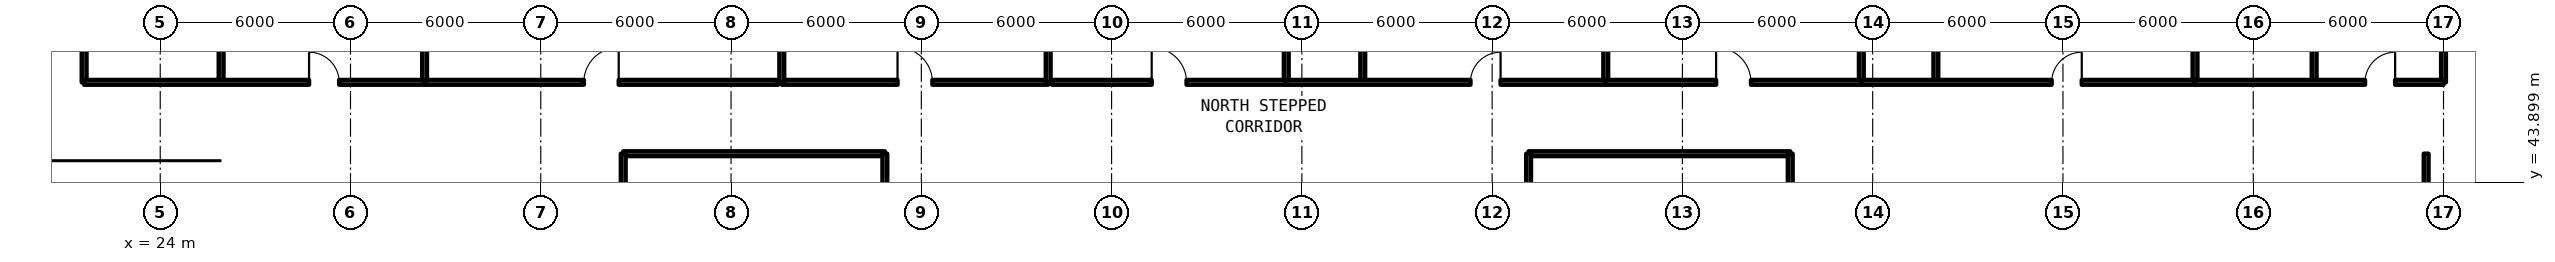
"""IFC4 building model, lengths in metres.
Left out: names, types, materials, properties, quantities, classifications, styles, units other than length and angle.
Written with IfcOpenShell. Run it as: python <this file> out.ifc"""

import sys

from ifc_helpers import new_model, si_unit, direction, frame, frame_2d, origin, place, context, subcontext, project, spatial, rectangle, extrude, element, fill, save


model = new_model("IFC4")
c1 = context("Model", 3, precision=1e-05, world=origin(), true_north=direction((0.0, 1.0)))
c2 = subcontext(c1, "Body", "Model", "MODEL_VIEW")
j1 = project(units=[si_unit("LENGTHUNIT", "METRE"), si_unit("PLANEANGLEUNIT", "RADIAN")], contexts=[c1])
p1 = place(None, origin())
s1 = spatial("IfcSite", under=j1, at=p1, CompositionType="ELEMENT")
p2 = place(p1, origin())
s2 = spatial("IfcBuilding", under=s1, at=p2, CompositionType="ELEMENT")
p3 = place(p2, frame((0.0, 0.0, 95.37)))
s3 = spatial("IfcBuildingStorey", under=s2, at=p3, CompositionType="ELEMENT", Elevation=95.37)
p4 = place(p3, frame((38.6, 44.8, 0.0), z_axis=(0.0, 0.0, 1.0), x_axis=(1.0, 0.0, 0.0)))
e1 = element("IfcWall", 1, at=p4, inside=s3, PredefinedType="SOLIDWALL", context=c2, shape_type="SweptSolid", body=[
    extrude(rectangle(XDim=8.25, YDim=0.15, at=frame_2d((4.125, 0.0))), origin(), (0.0, 0.0, 1.0), 2.35),
])
p5 = place(p3, frame((38.6, 22.4, 0.0), z_axis=(0.0, 0.0, 1.0), x_axis=(0.0, 1.0, 0.0)))
e2 = element("IfcWall", 2, at=p5, inside=s3, PredefinedType="SOLIDWALL", context=c2, shape_type="SweptSolid", body=[
    extrude(rectangle(XDim=22.4, YDim=0.15, at=frame_2d((11.2, 0.0))), origin(), (0.0, 0.0, 1.0), 2.35),
])
p6 = place(p5, frame((8.025, 0.0, 0.0)))
e3 = element("IfcOpeningElement", 3, at=p6, cuts=e2, PredefinedType="OPENING", context=c2, shape_type="SweptSolid", body=[
    extrude(rectangle(XDim=0.95, YDim=2.15, at=frame_2d((0.475, 1.075))), frame((0.0, 0.085, 0.0), z_axis=(0.0, -1.0, 0.0), x_axis=(1.0, 0.0, 0.0)), (0.0, 0.0, 1.0), 0.17),
])
p7 = place(p3, frame((46.85, 22.4, 0.0), z_axis=(0.0, 0.0, 1.0), x_axis=(0.0, 1.0, 0.0)))
e4 = element("IfcWall", 4, at=p7, inside=s3, PredefinedType="SOLIDWALL", context=c2, shape_type="SweptSolid", body=[
    extrude(rectangle(XDim=22.4, YDim=0.15, at=frame_2d((11.2, 0.0))), origin(), (0.0, 0.0, 1.0), 2.35),
])
p8 = place(p3, frame((67.15, 44.8, 0.0), z_axis=(0.0, 0.0, 1.0), x_axis=(1.0, 0.0, 0.0)))
e5 = element("IfcWall", 5, at=p8, inside=s3, PredefinedType="SOLIDWALL", context=c2, shape_type="SweptSolid", body=[
    extrude(rectangle(XDim=8.25, YDim=0.15, at=frame_2d((4.125, 0.0))), origin(), (0.0, 0.0, 1.0), 2.35),
])
p9 = place(p3, frame((67.15, 22.4, 0.0), z_axis=(0.0, 0.0, 1.0), x_axis=(0.0, 1.0, 0.0)))
e6 = element("IfcWall", 6, at=p9, inside=s3, PredefinedType="SOLIDWALL", context=c2, shape_type="SweptSolid", body=[
    extrude(rectangle(XDim=22.4, YDim=0.15, at=frame_2d((11.2, 0.0))), origin(), (0.0, 0.0, 1.0), 2.35),
])
p10 = place(p3, frame((75.4, 22.4, 0.0), z_axis=(0.0, 0.0, 1.0), x_axis=(0.0, 1.0, 0.0)))
e7 = element("IfcWall", 7, at=p10, inside=s3, PredefinedType="SOLIDWALL", context=c2, shape_type="SweptSolid", body=[
    extrude(rectangle(XDim=22.4, YDim=0.15, at=frame_2d((11.2, 0.0))), origin(), (0.0, 0.0, 1.0), 2.35),
])
p11 = place(p10, frame((8.025, 0.0, 0.0)))
e8 = element("IfcOpeningElement", 8, at=p11, cuts=e7, PredefinedType="OPENING", context=c2, shape_type="SweptSolid", body=[
    extrude(rectangle(XDim=0.95, YDim=2.15, at=frame_2d((0.475, 1.075))), frame((0.0, 0.085, 0.0), z_axis=(0.0, -1.0, 0.0), x_axis=(1.0, 0.0, 0.0)), (0.0, 0.0, 1.0), 0.17),
])
p12 = place(p3, frame((95.452, 39.6, 0.0), z_axis=(0.0, 0.0, 1.0), x_axis=(0.0, 1.0, 0.0)))
e9 = element("IfcWall", 9, at=p12, inside=s3, PredefinedType="PARTITIONING", context=c2, shape_type="SweptSolid", body=[
    extrude(rectangle(XDim=5.2, YDim=0.15, at=frame_2d((2.6, 0.0))), origin(), (0.0, 0.0, 1.0), 2.35),
])
p13 = place(p3, frame((43.6, 47.05, 0.0), z_axis=(0.0, 0.0, 1.0), x_axis=(1.0, 0.0, 0.0)))
e10 = element("IfcWall", 10, at=p13, inside=s3, PredefinedType="SOLIDWALL", context=c2, shape_type="SweptSolid", body=[
    extrude(rectangle(XDim=8.4, YDim=0.15, at=frame_2d((4.2, 0.0))), origin(), (0.0, 0.0, 1.0), 2.35),
])
p14 = place(p13, frame((3.65, 0.0, 0.0)))
e11 = element("IfcOpeningElement", 11, at=p14, cuts=e10, PredefinedType="OPENING", context=c2, shape_type="SweptSolid", body=[
    extrude(rectangle(XDim=1.1, YDim=2.15, at=frame_2d((0.55, 1.075))), frame((0.0, 0.085, 0.0), z_axis=(0.0, -1.0, 0.0), x_axis=(1.0, 0.0, 0.0)), (0.0, 0.0, 1.0), 0.17),
])
for number, where, z_axis, x_axis in (
    (12, (43.6, 47.05, 0.0), (0.0, 0.0, 1.0), (0.0, 1.0, 0.0)),
    (13, (52.0, 47.05, 0.0), (0.0, 0.0, 1.0), (0.0, 1.0, 0.0)),
    (14, (21.6, 47.05, 0.0), (0.0, 0.0, 1.0), (0.0, 1.0, 0.0)),
    (15, (32.336, 47.05, 0.0), (0.0, 0.0, 1.0), (0.0, 1.0, 0.0)),
):
    element("IfcWall", number, at=place(p3, frame(where, z_axis=z_axis, x_axis=x_axis)), inside=s3, PredefinedType="SOLIDWALL", context=c2, shape_type="SweptSolid", body=[
        extrude(rectangle(XDim=10.3, YDim=0.15, at=frame_2d((5.15, 0.0))), origin(), (0.0, 0.0, 1.0), 2.35),
    ])
p15 = place(p3, frame((25.92, 47.05, 0.0), z_axis=(0.0, 0.0, 1.0), x_axis=(0.0, 1.0, 0.0)))
e16 = element("IfcWall", 16, at=p15, inside=s3, PredefinedType="PARTITIONING", context=c2, shape_type="SweptSolid", body=[
    extrude(rectangle(XDim=5.557, YDim=0.15, at=frame_2d((2.779, 0.0))), origin(), (0.0, 0.0, 1.0), 2.35),
])
p16 = place(p15, frame((1.214, 0.0, 0.0)))
e17 = element("IfcOpeningElement", 17, at=p16, cuts=e16, PredefinedType="OPENING", context=c2, shape_type="SweptSolid", body=[
    extrude(rectangle(XDim=0.85, YDim=2.1, at=frame_2d((0.425, 1.05))), frame((0.0, 0.085, 0.0), z_axis=(0.0, -1.0, 0.0), x_axis=(1.0, 0.0, 0.0)), (0.0, 0.0, 1.0), 0.17),
])
p17 = place(p15, frame((3.993, 0.0, 0.0)))
e18 = element("IfcOpeningElement", 18, at=p17, cuts=e16, PredefinedType="OPENING", context=c2, shape_type="SweptSolid", body=[
    extrude(rectangle(XDim=0.85, YDim=2.1, at=frame_2d((0.425, 1.05))), frame((0.0, 0.085, 0.0), z_axis=(0.0, -1.0, 0.0), x_axis=(1.0, 0.0, 0.0)), (0.0, 0.0, 1.0), 0.17),
])
p18 = place(p3, frame((21.6, 47.05, 0.0), z_axis=(0.0, 0.0, 1.0), x_axis=(1.0, 0.0, 0.0)))
e19 = element("IfcWall", 19, at=p18, inside=s3, PredefinedType="SOLIDWALL", context=c2, shape_type="SweptSolid", body=[
    extrude(rectangle(XDim=10.736, YDim=0.15, at=frame_2d((5.368, 0.0))), origin(), (0.0, 0.0, 1.0), 2.35),
])
p19 = place(p18, frame((7.093, 0.0, 0.0)))
e20 = element("IfcOpeningElement", 20, at=p19, cuts=e19, PredefinedType="OPENING", context=c2, shape_type="SweptSolid", body=[
    extrude(rectangle(XDim=0.95, YDim=2.15, at=frame_2d((0.475, 1.075))), frame((0.0, 0.085, 0.0), z_axis=(0.0, -1.0, 0.0), x_axis=(1.0, 0.0, 0.0)), (0.0, 0.0, 1.0), 0.17),
])
p20 = place(p3, frame((32.336, 47.05, 0.0), z_axis=(0.0, 0.0, 1.0), x_axis=(1.0, 0.0, 0.0)))
e21 = element("IfcWall", 21, at=p20, inside=s3, PredefinedType="SOLIDWALL", context=c2, shape_type="SweptSolid", body=[
    extrude(rectangle(XDim=11.144, YDim=0.15, at=frame_2d((5.572, 0.0))), origin(), (0.0, 0.0, 1.0), 2.35),
])
p21 = place(p20, frame((5.022, 0.0, 0.0)))
e22 = element("IfcOpeningElement", 22, at=p21, cuts=e21, PredefinedType="OPENING", context=c2, shape_type="SweptSolid", body=[
    extrude(rectangle(XDim=1.1, YDim=2.15, at=frame_2d((0.55, 1.075))), frame((0.0, 0.085, 0.0), z_axis=(0.0, -1.0, 0.0), x_axis=(1.0, 0.0, 0.0)), (0.0, 0.0, 1.0), 0.17),
])
for number, where, z_axis, x_axis in (
    (23, (96.0, 47.05, 0.0), (0.0, 0.0, 1.0), (0.0, 1.0, 0.0)),
    (24, (59.508, 47.05, 0.0), (0.0, 0.0, 1.0), (0.0, 1.0, 0.0)),
):
    element("IfcWall", number, at=place(p3, frame(where, z_axis=z_axis, x_axis=x_axis)), inside=s3, PredefinedType="SOLIDWALL", context=c2, shape_type="SweptSolid", body=[
        extrude(rectangle(XDim=10.3, YDim=0.15, at=frame_2d((5.15, 0.0))), origin(), (0.0, 0.0, 1.0), 2.35),
    ])
p22 = place(p3, frame((52.12, 47.05, 0.0), z_axis=(0.0, 0.0, 1.0), x_axis=(1.0, 0.0, 0.0)))
e25 = element("IfcWall", 25, at=p22, inside=s3, PredefinedType="SOLIDWALL", context=c2, shape_type="SweptSolid", body=[
    extrude(rectangle(XDim=7.388, YDim=0.15, at=frame_2d((3.694, 0.0))), origin(), (0.0, 0.0, 1.0), 2.35),
])
p23 = place(p22, frame((3.144, 0.0, 0.0)))
e26 = element("IfcOpeningElement", 26, at=p23, cuts=e25, PredefinedType="OPENING", context=c2, shape_type="SweptSolid", body=[
    extrude(rectangle(XDim=1.1, YDim=2.15, at=frame_2d((0.55, 1.075))), frame((0.0, 0.085, 0.0), z_axis=(0.0, -1.0, 0.0), x_axis=(1.0, 0.0, 0.0)), (0.0, 0.0, 1.0), 0.17),
])
p24 = place(p3, frame((69.583, 47.05, 0.0), z_axis=(0.0, 0.0, 1.0), x_axis=(0.0, 1.0, 0.0)))
e27 = element("IfcWall", 27, at=p24, inside=s3, PredefinedType="SOLIDWALL", context=c2, shape_type="SweptSolid", body=[
    extrude(rectangle(XDim=10.3, YDim=0.15, at=frame_2d((5.15, 0.0))), origin(), (0.0, 0.0, 1.0), 2.35),
])
p25 = place(p3, frame((61.92, 47.05, 0.0), z_axis=(0.0, 0.0, 1.0), x_axis=(0.0, 1.0, 0.0)))
e28 = element("IfcWall", 28, at=p25, inside=s3, PredefinedType="PARTITIONING", context=c2, shape_type="SweptSolid", body=[
    extrude(rectangle(XDim=5.1, YDim=0.15, at=frame_2d((2.55, 0.0))), origin(), (0.0, 0.0, 1.0), 2.35),
])
p26 = place(p25, frame((1.08, 0.0, 0.0)))
e29 = element("IfcOpeningElement", 29, at=p26, cuts=e28, PredefinedType="OPENING", context=c2, shape_type="SweptSolid", body=[
    extrude(rectangle(XDim=0.85, YDim=2.1, at=frame_2d((0.425, 1.05))), frame((0.0, 0.085, 0.0), z_axis=(0.0, -1.0, 0.0), x_axis=(1.0, 0.0, 0.0)), (0.0, 0.0, 1.0), 0.17),
])
p27 = place(p25, frame((3.629, 0.0, 0.0)))
e30 = element("IfcOpeningElement", 30, at=p27, cuts=e28, PredefinedType="OPENING", context=c2, shape_type="SweptSolid", body=[
    extrude(rectangle(XDim=0.85, YDim=2.1, at=frame_2d((0.425, 1.05))), frame((0.0, 0.085, 0.0), z_axis=(0.0, -1.0, 0.0), x_axis=(1.0, 0.0, 0.0)), (0.0, 0.0, 1.0), 0.17),
])
p28 = place(p3, frame((59.508, 47.05, 0.0), z_axis=(0.0, 0.0, 1.0), x_axis=(1.0, 0.0, 0.0)))
e31 = element("IfcWall", 31, at=p28, inside=s3, PredefinedType="SOLIDWALL", context=c2, shape_type="SweptSolid", body=[
    extrude(rectangle(XDim=10.074, YDim=0.15, at=frame_2d((5.037, 0.0))), origin(), (0.0, 0.0, 1.0), 2.35),
])
p29 = place(p28, frame((5.808, 0.0, 0.0)))
e32 = element("IfcOpeningElement", 32, at=p29, cuts=e31, PredefinedType="OPENING", context=c2, shape_type="SweptSolid", body=[
    extrude(rectangle(XDim=0.95, YDim=2.15, at=frame_2d((0.475, 1.075))), frame((0.0, 0.085, 0.0), z_axis=(0.0, -1.0, 0.0), x_axis=(1.0, 0.0, 0.0)), (0.0, 0.0, 1.0), 0.17),
])
p30 = place(p3, frame((77.642, 47.05, 0.0), z_axis=(0.0, 0.0, 1.0), x_axis=(0.0, 1.0, 0.0)))
e33 = element("IfcWall", 33, at=p30, inside=s3, PredefinedType="SOLIDWALL", context=c2, shape_type="SweptSolid", body=[
    extrude(rectangle(XDim=10.3, YDim=0.15, at=frame_2d((5.15, 0.0))), origin(), (0.0, 0.0, 1.0), 2.35),
])
p31 = place(p3, frame((69.583, 47.05, 0.0), z_axis=(0.0, 0.0, 1.0), x_axis=(1.0, 0.0, 0.0)))
e34 = element("IfcWall", 34, at=p31, inside=s3, PredefinedType="SOLIDWALL", context=c2, shape_type="SweptSolid", body=[
    extrude(rectangle(XDim=8.06, YDim=0.15, at=frame_2d((4.03, 0.0))), origin(), (0.0, 0.0, 1.0), 2.35),
])
p32 = place(p31, frame((3.48, 0.0, 0.0)))
e35 = element("IfcOpeningElement", 35, at=p32, cuts=e34, PredefinedType="OPENING", context=c2, shape_type="SweptSolid", body=[
    extrude(rectangle(XDim=1.1, YDim=2.15, at=frame_2d((0.55, 1.075))), frame((0.0, 0.085, 0.0), z_axis=(0.0, -1.0, 0.0), x_axis=(1.0, 0.0, 0.0)), (0.0, 0.0, 1.0), 0.17),
])
p33 = place(p3, frame((88.164, 47.05, 0.0), z_axis=(0.0, 0.0, 1.0), x_axis=(0.0, 1.0, 0.0)))
e36 = element("IfcWall", 36, at=p33, inside=s3, PredefinedType="SOLIDWALL", context=c2, shape_type="SweptSolid", body=[
    extrude(rectangle(XDim=10.3, YDim=0.15, at=frame_2d((5.15, 0.0))), origin(), (0.0, 0.0, 1.0), 2.35),
])
p34 = place(p3, frame((79.992, 47.05, 0.0), z_axis=(0.0, 0.0, 1.0), x_axis=(0.0, 1.0, 0.0)))
e37 = element("IfcWall", 37, at=p34, inside=s3, PredefinedType="PARTITIONING", context=c2, shape_type="SweptSolid", body=[
    extrude(rectangle(XDim=5.1, YDim=0.15, at=frame_2d((2.55, 0.0))), origin(), (0.0, 0.0, 1.0), 2.35),
])
p35 = place(p34, frame((1.08, 0.0, 0.0)))
e38 = element("IfcOpeningElement", 38, at=p35, cuts=e37, PredefinedType="OPENING", context=c2, shape_type="SweptSolid", body=[
    extrude(rectangle(XDim=0.85, YDim=2.1, at=frame_2d((0.425, 1.05))), frame((0.0, 0.085, 0.0), z_axis=(0.0, -1.0, 0.0), x_axis=(1.0, 0.0, 0.0)), (0.0, 0.0, 1.0), 0.17),
])
p36 = place(p34, frame((3.629, 0.0, 0.0)))
e39 = element("IfcOpeningElement", 39, at=p36, cuts=e37, PredefinedType="OPENING", context=c2, shape_type="SweptSolid", body=[
    extrude(rectangle(XDim=0.85, YDim=2.1, at=frame_2d((0.425, 1.05))), frame((0.0, 0.085, 0.0), z_axis=(0.0, -1.0, 0.0), x_axis=(1.0, 0.0, 0.0)), (0.0, 0.0, 1.0), 0.17),
])
p37 = place(p3, frame((77.642, 47.05, 0.0), z_axis=(0.0, 0.0, 1.0), x_axis=(1.0, 0.0, 0.0)))
e40 = element("IfcWall", 40, at=p37, inside=s3, PredefinedType="SOLIDWALL", context=c2, shape_type="SweptSolid", body=[
    extrude(rectangle(XDim=10.522, YDim=0.15, at=frame_2d((5.261, 0.0))), origin(), (0.0, 0.0, 1.0), 2.35),
])
p38 = place(p37, frame((6.001, 0.0, 0.0)))
e41 = element("IfcOpeningElement", 41, at=p38, cuts=e40, PredefinedType="OPENING", context=c2, shape_type="SweptSolid", body=[
    extrude(rectangle(XDim=0.95, YDim=2.15, at=frame_2d((0.475, 1.075))), frame((0.0, 0.085, 0.0), z_axis=(0.0, -1.0, 0.0), x_axis=(1.0, 0.0, 0.0)), (0.0, 0.0, 1.0), 0.17),
])
p39 = place(p3, frame((91.92, 47.05, 0.0), z_axis=(0.0, 0.0, 1.0), x_axis=(0.0, 1.0, 0.0)))
e42 = element("IfcWall", 42, at=p39, inside=s3, PredefinedType="PARTITIONING", context=c2, shape_type="SweptSolid", body=[
    extrude(rectangle(XDim=6.535, YDim=0.15, at=frame_2d((3.268, 0.0))), origin(), (0.0, 0.0, 1.0), 2.35),
])
p40 = place(p39, frame((1.503, 0.0, 0.0)))
e43 = element("IfcOpeningElement", 43, at=p40, cuts=e42, PredefinedType="OPENING", context=c2, shape_type="SweptSolid", body=[
    extrude(rectangle(XDim=0.85, YDim=2.1, at=frame_2d((0.425, 1.05))), frame((0.0, 0.085, 0.0), z_axis=(0.0, -1.0, 0.0), x_axis=(1.0, 0.0, 0.0)), (0.0, 0.0, 1.0), 0.17),
])
p41 = place(p39, frame((4.771, 0.0, 0.0)))
e44 = element("IfcOpeningElement", 44, at=p41, cuts=e42, PredefinedType="OPENING", context=c2, shape_type="SweptSolid", body=[
    extrude(rectangle(XDim=0.85, YDim=2.1, at=frame_2d((0.425, 1.05))), frame((0.0, 0.085, 0.0), z_axis=(0.0, -1.0, 0.0), x_axis=(1.0, 0.0, 0.0)), (0.0, 0.0, 1.0), 0.17),
])
p42 = place(p3, frame((88.164, 47.05, 0.0), z_axis=(0.0, 0.0, 1.0), x_axis=(1.0, 0.0, 0.0)))
e45 = element("IfcWall", 45, at=p42, inside=s3, PredefinedType="SOLIDWALL", context=c2, shape_type="SweptSolid", body=[
    extrude(rectangle(XDim=7.836, YDim=0.15, at=frame_2d((3.918, 0.0))), origin(), (0.0, 0.0, 1.0), 2.35),
])
p43 = place(p42, frame((5.361, 0.0, 0.0)))
e46 = element("IfcOpeningElement", 46, at=p43, cuts=e45, PredefinedType="OPENING", context=c2, shape_type="SweptSolid", body=[
    extrude(rectangle(XDim=0.95, YDim=2.15, at=frame_2d((0.475, 1.075))), frame((0.0, 0.085, 0.0), z_axis=(0.0, -1.0, 0.0), x_axis=(1.0, 0.0, 0.0)), (0.0, 0.0, 1.0), 0.17),
])
p44 = place(p14, origin())
e47 = element("IfcDoor", 47, at=p44, inside=s3, OperationType="SINGLE_SWING_LEFT", PredefinedType="DOOR", context=c2, shape_type="SweptSolid", body=[
    extrude(rectangle(XDim=1.1, YDim=2.15, at=frame_2d((0.55, 1.075))), frame((0.0, 0.025, 0.0), z_axis=(0.0, -1.0, 0.0), x_axis=(1.0, 0.0, 0.0)), (0.0, 0.0, 1.0), 0.05),
])
fill(e11, e47)
p45 = place(p19, origin())
e48 = element("IfcDoor", 48, at=p45, inside=s3, OperationType="SINGLE_SWING_LEFT", PredefinedType="DOOR", context=c2, shape_type="SweptSolid", body=[
    extrude(rectangle(XDim=0.95, YDim=2.15, at=frame_2d((0.475, 1.075))), frame((0.0, 0.025, 0.0), z_axis=(0.0, -1.0, 0.0), x_axis=(1.0, 0.0, 0.0)), (0.0, 0.0, 1.0), 0.05),
])
fill(e20, e48)
p46 = place(p21, origin())
e49 = element("IfcDoor", 49, at=p46, inside=s3, OperationType="SINGLE_SWING_RIGHT", PredefinedType="DOOR", context=c2, shape_type="SweptSolid", body=[
    extrude(rectangle(XDim=1.1, YDim=2.15, at=frame_2d((0.55, 1.075))), frame((0.0, 0.025, 0.0), z_axis=(0.0, -1.0, 0.0), x_axis=(1.0, 0.0, 0.0)), (0.0, 0.0, 1.0), 0.05),
])
fill(e22, e49)
p47 = place(p23, origin())
e50 = element("IfcDoor", 50, at=p47, inside=s3, OperationType="SINGLE_SWING_LEFT", PredefinedType="DOOR", context=c2, shape_type="SweptSolid", body=[
    extrude(rectangle(XDim=1.1, YDim=2.15, at=frame_2d((0.55, 1.075))), frame((0.0, 0.025, 0.0), z_axis=(0.0, -1.0, 0.0), x_axis=(1.0, 0.0, 0.0)), (0.0, 0.0, 1.0), 0.05),
])
fill(e26, e50)
p48 = place(p29, origin())
e51 = element("IfcDoor", 51, at=p48, inside=s3, OperationType="SINGLE_SWING_RIGHT", PredefinedType="DOOR", context=c2, shape_type="SweptSolid", body=[
    extrude(rectangle(XDim=0.95, YDim=2.15, at=frame_2d((0.475, 1.075))), frame((0.0, 0.025, 0.0), z_axis=(0.0, -1.0, 0.0), x_axis=(1.0, 0.0, 0.0)), (0.0, 0.0, 1.0), 0.05),
])
fill(e32, e51)
p49 = place(p32, origin())
e52 = element("IfcDoor", 52, at=p49, inside=s3, OperationType="SINGLE_SWING_LEFT", PredefinedType="DOOR", context=c2, shape_type="SweptSolid", body=[
    extrude(rectangle(XDim=1.1, YDim=2.15, at=frame_2d((0.55, 1.075))), frame((0.0, 0.025, 0.0), z_axis=(0.0, -1.0, 0.0), x_axis=(1.0, 0.0, 0.0)), (0.0, 0.0, 1.0), 0.05),
])
fill(e35, e52)
p50 = place(p38, origin())
e53 = element("IfcDoor", 53, at=p50, inside=s3, OperationType="SINGLE_SWING_RIGHT", PredefinedType="DOOR", context=c2, shape_type="SweptSolid", body=[
    extrude(rectangle(XDim=0.95, YDim=2.15, at=frame_2d((0.475, 1.075))), frame((0.0, 0.025, 0.0), z_axis=(0.0, -1.0, 0.0), x_axis=(1.0, 0.0, 0.0)), (0.0, 0.0, 1.0), 0.05),
])
fill(e41, e53)
p51 = place(p43, origin())
e54 = element("IfcDoor", 54, at=p51, inside=s3, OperationType="SINGLE_SWING_RIGHT", PredefinedType="DOOR", context=c2, shape_type="SweptSolid", body=[
    extrude(rectangle(XDim=0.95, YDim=2.15, at=frame_2d((0.475, 1.075))), frame((0.0, 0.025, 0.0), z_axis=(0.0, -1.0, 0.0), x_axis=(1.0, 0.0, 0.0)), (0.0, 0.0, 1.0), 0.05),
])
fill(e46, e54)
save(model, sys.argv[1])
